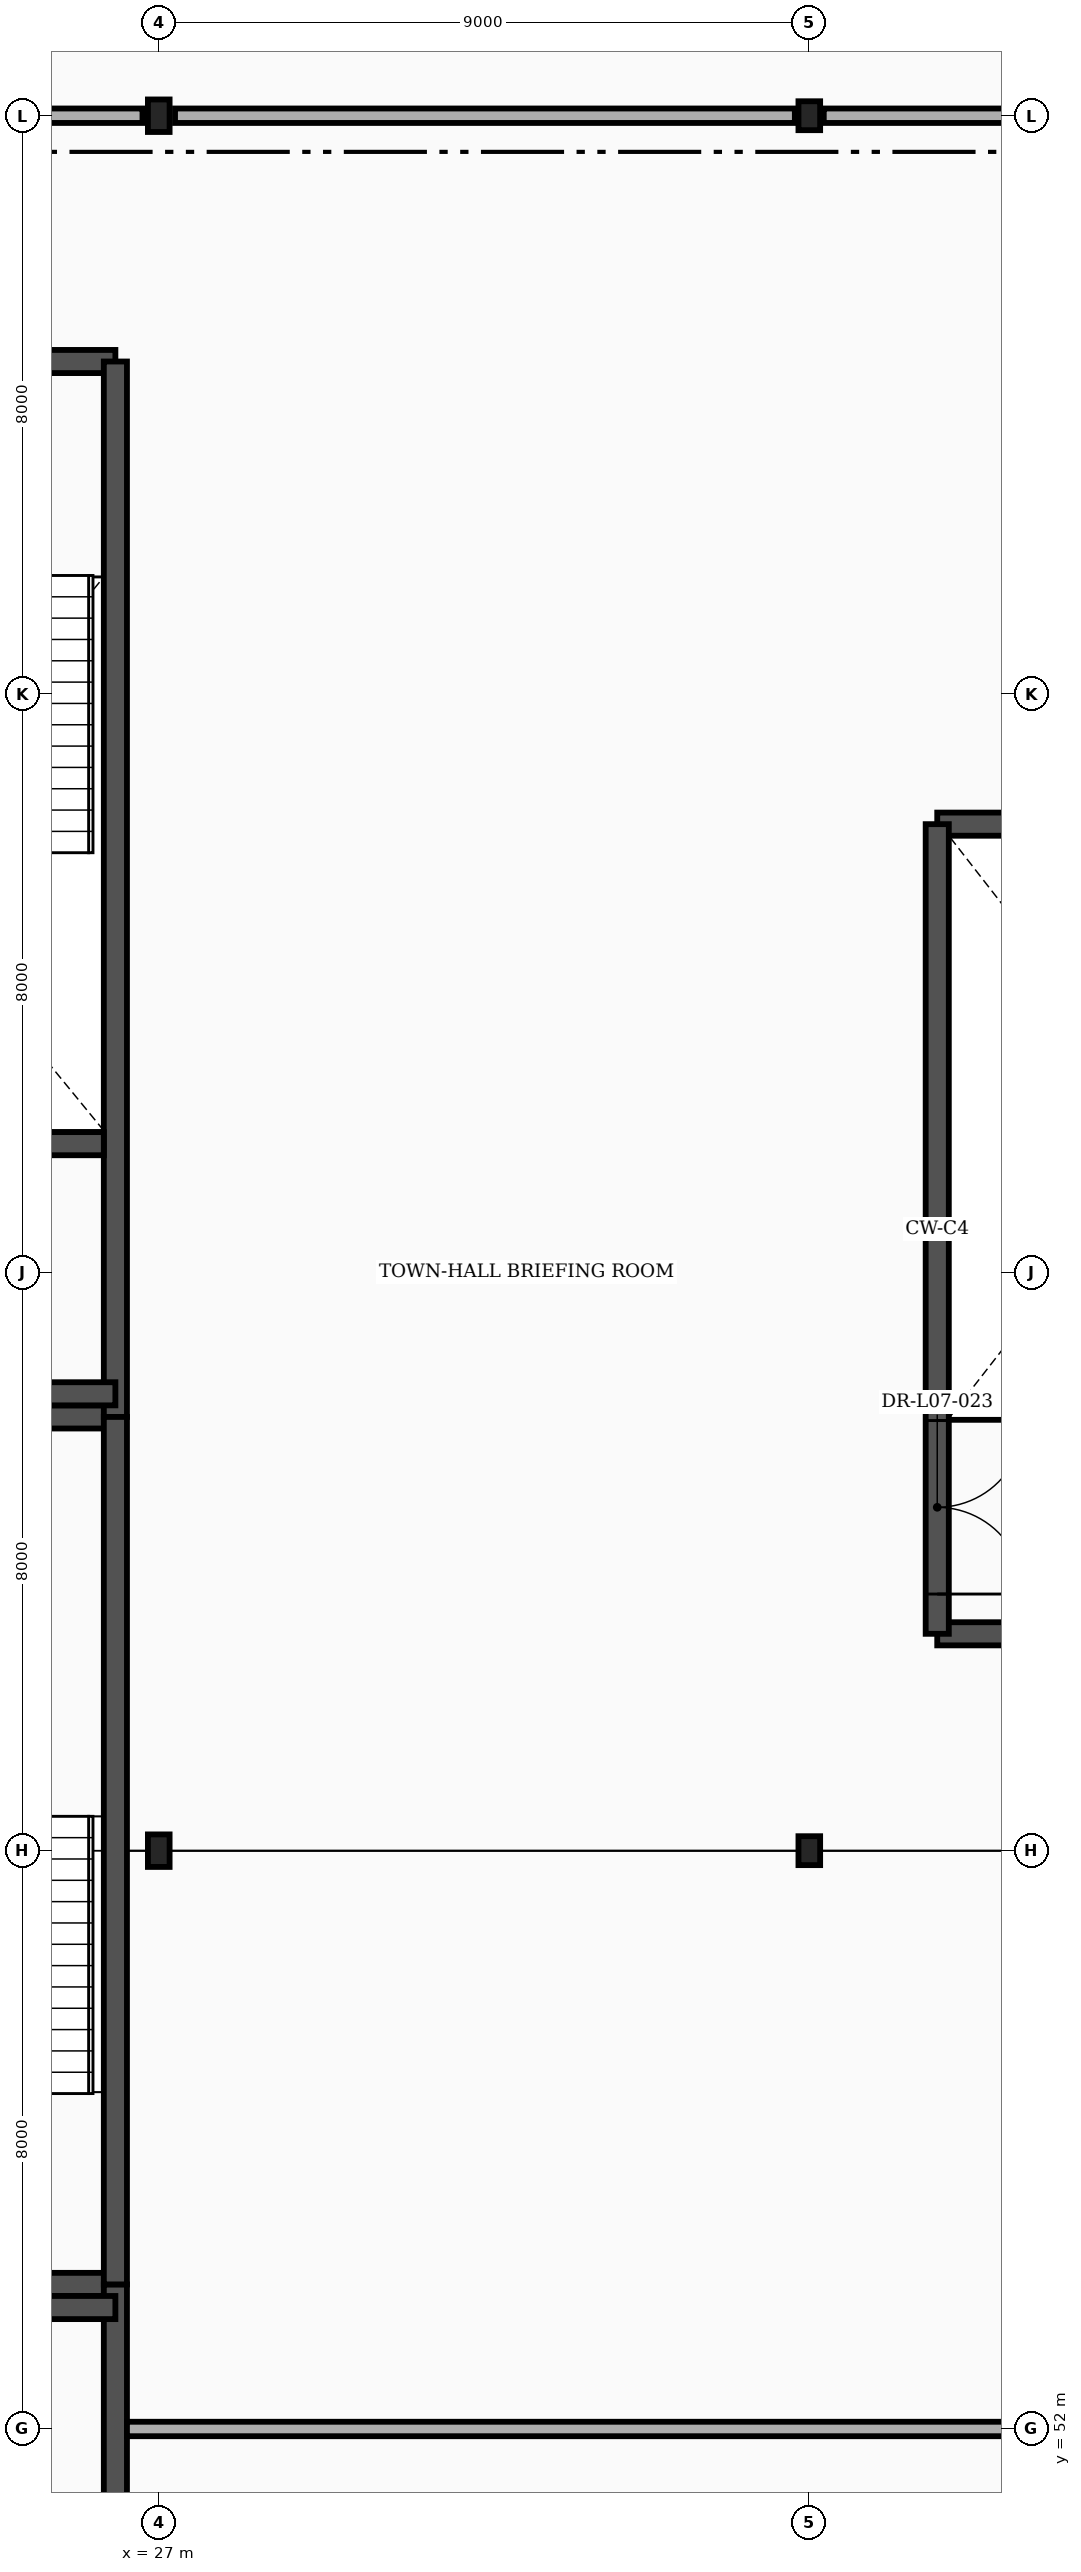
"""IFC4 building model, lengths in metres.
Left out: names, types, materials, properties, quantities, classifications, styles, units other than length and angle.
Written with IfcOpenShell. Run it as: python <this file> out.ifc"""

import sys

from ifc_helpers import new_model, si_unit, direction, frame, frame_2d, origin, origin_2d, place, context, subcontext, project, spatial, rectangle, i_section, extrude, element, fill, save


model = new_model("IFC4")
c1 = context("Model", 3, precision=1e-05, world=origin(), true_north=direction((0.0, 1.0)))
c2 = subcontext(c1, "Body", "Model", "MODEL_VIEW")
j1 = project(units=[si_unit("LENGTHUNIT", "METRE"), si_unit("PLANEANGLEUNIT", "RADIAN")], contexts=[c1])
p1 = place(None, origin())
s1 = spatial("IfcSite", under=j1, at=p1, CompositionType="ELEMENT")
p2 = place(p1, origin())
s2 = spatial("IfcBuilding", under=s1, at=p2, CompositionType="ELEMENT")
p3 = place(p2, frame((0.0, 0.0, 33.3)))
s3 = spatial("IfcBuildingStorey", under=s2, at=p3, CompositionType="ELEMENT", Elevation=33.3)
for number, where, z_axis, x_axis in (
    (1, (27.0, 60.0, 0.0), (0.0, 0.0, 1.0), (1.0, 0.0, 0.0)),
    (2, (27.0, 84.0, 0.0), (0.0, 0.0, 1.0), (1.0, 0.0, 0.0)),
):
    element("IfcColumn", number, at=place(p3, frame(where, z_axis=z_axis, x_axis=x_axis)), inside=s3, PredefinedType="COLUMN", context=c2, shape_type="SweptSolid", body=[
        extrude(i_section(OverallWidth=0.3, OverallDepth=0.45, WebThickness=0.014, FlangeThickness=0.026, FilletRadius=0.027, at=origin_2d()), origin(), (0.0, 0.0, 1.0), 4.5),
    ])
for number, where, z_axis, x_axis in (
    (3, (36.0, 84.0, 0.0), (0.0, 0.0, 1.0), (1.0, 0.0, 0.0)),
    (4, (36.0, 60.0, 0.0), (0.0, 0.0, 1.0), (1.0, 0.0, 0.0)),
):
    element("IfcColumn", number, at=place(p3, frame(where, z_axis=z_axis, x_axis=x_axis)), inside=s3, PredefinedType="COLUMN", context=c2, shape_type="SweptSolid", body=[
        extrude(i_section(OverallWidth=0.3, OverallDepth=0.4, WebThickness=0.013, FlangeThickness=0.024, FilletRadius=0.027, at=origin_2d()), origin(), (0.0, 0.0, 1.0), 4.5),
    ])
p4 = place(p3, frame((19.8, 54.0, 0.0), z_axis=(0.0, 0.0, 1.0), x_axis=(1.0, 0.0, 0.0)))
e5 = element("IfcWall", 5, at=p4, inside=s3, PredefinedType="SHEAR", context=c2, shape_type="SweptSolid", body=[
    extrude(rectangle(XDim=6.6, YDim=0.32, at=frame_2d((3.3, 0.0))), origin(), (0.0, 0.0, 1.0), 4.255),
])
p5 = place(p3, frame((26.4, 39.4, 0.0), z_axis=(0.0, 0.0, 1.0), x_axis=(0.0, 1.0, 0.0)))
e6 = element("IfcWall", 6, at=p5, inside=s3, PredefinedType="SHEAR", context=c2, shape_type="SweptSolid", body=[
    extrude(rectangle(XDim=14.6, YDim=0.32, at=frame_2d((7.3, 0.0))), origin(), (0.0, 0.0, 1.0), 4.255),
])
for number, where, z_axis, x_axis in (
    (7, (19.8, 66.0, 0.0), (0.0, 0.0, 1.0), (1.0, 0.0, 0.0)),
    (8, (19.8, 80.6, 0.0), (0.0, 0.0, 1.0), (1.0, 0.0, 0.0)),
):
    element("IfcWall", number, at=place(p3, frame(where, z_axis=z_axis, x_axis=x_axis)), inside=s3, PredefinedType="SHEAR", context=c2, shape_type="SweptSolid", body=[
        extrude(rectangle(XDim=6.6, YDim=0.32, at=frame_2d((3.3, 0.0))), origin(), (0.0, 0.0, 1.0), 4.255),
    ])
p6 = place(p3, frame((26.4, 66.0, 0.0), z_axis=(0.0, 0.0, 1.0), x_axis=(0.0, 1.0, 0.0)))
e9 = element("IfcWall", 9, at=p6, inside=s3, PredefinedType="SHEAR", context=c2, shape_type="SweptSolid", body=[
    extrude(rectangle(XDim=14.6, YDim=0.32, at=frame_2d((7.3, 0.0))), origin(), (0.0, 0.0, 1.0), 4.255),
])
p7 = place(p3, frame((19.96, 69.78, 0.0), z_axis=(0.0, 0.0, 1.0), x_axis=(1.0, 0.0, 0.0)))
e10 = element("IfcWall", 10, at=p7, inside=s3, PredefinedType="SHEAR", context=c2, shape_type="SweptSolid", body=[
    extrude(rectangle(XDim=6.28, YDim=0.32, at=frame_2d((3.14, 0.0))), origin(), (0.0, 0.0, 1.0), 4.255),
])
for number, where, z_axis, x_axis in (
    (11, (37.77, 63.0, 0.0), (0.0, 0.0, 1.0), (1.0, 0.0, 0.0)),
    (12, (37.77, 74.2, 0.0), (0.0, 0.0, 1.0), (1.0, 0.0, 0.0)),
):
    element("IfcWall", number, at=place(p3, frame(where, z_axis=z_axis, x_axis=x_axis)), inside=s3, PredefinedType="SHEAR", context=c2, shape_type="SweptSolid", body=[
        extrude(rectangle(XDim=6.6, YDim=0.32, at=frame_2d((3.3, 0.0))), origin(), (0.0, 0.0, 1.0), 4.255),
    ])
p8 = place(p3, frame((37.77, 63.0, 0.0), z_axis=(0.0, 0.0, 1.0), x_axis=(0.0, 1.0, 0.0)))
e13 = element("IfcWall", 13, at=p8, inside=s3, PredefinedType="SHEAR", context=c2, shape_type="SweptSolid", body=[
    extrude(rectangle(XDim=11.2, YDim=0.32, at=frame_2d((5.6, 0.0))), origin(), (0.0, 0.0, 1.0), 4.255),
])
p9 = place(p8, frame((0.55, 0.0, 0.0)))
e14 = element("IfcOpeningElement", 14, at=p9, cuts=e13, PredefinedType="OPENING", context=c2, shape_type="SweptSolid", body=[
    extrude(rectangle(XDim=2.4, YDim=2.25, at=frame_2d((1.2, 1.125))), frame((0.0, 0.172, 0.0), z_axis=(0.0, -1.0, 0.0), x_axis=(1.0, 0.0, 0.0)), (0.0, 0.0, 1.0), 0.344),
])
for number, where, z_axis, x_axis in (
    (15, (19.8, 53.68, 0.0), (0.0, 0.0, 1.0), (1.0, 0.0, 0.0)),
    (16, (19.8, 66.32, 0.0), (0.0, 0.0, 1.0), (1.0, 0.0, 0.0)),
):
    element("IfcWall", number, at=place(p3, frame(where, z_axis=z_axis, x_axis=x_axis)), inside=s3, PredefinedType="SHEAR", context=c2, shape_type="SweptSolid", body=[
        extrude(rectangle(XDim=6.6, YDim=0.32, at=frame_2d((3.3, 0.0))), origin(), (0.0, 0.0, 1.0), 4.255),
    ])
p10 = place(p3, frame((26.4, 54.0, 0.0), z_axis=(0.0, 0.0, 1.0), x_axis=(0.0, 1.0, 0.0)))
e17 = element("IfcWall", 17, at=p10, inside=s3, PredefinedType="SHEAR", context=c2, shape_type="SweptSolid", body=[
    extrude(rectangle(XDim=12.0, YDim=0.32, at=frame_2d((6.0, 0.0))), origin(), (0.0, 0.0, 1.0), 4.255),
])
p11 = place(p3, frame((26.56, 52.0, 0.0), z_axis=(0.0, 0.0, 1.0), x_axis=(1.0, 0.0, 0.0)))
e18 = element("IfcWall", 18, at=p11, inside=s3, PredefinedType="PARTITIONING", context=c2, shape_type="SweptSolid", body=[
    extrude(rectangle(XDim=18.27, YDim=0.2, at=frame_2d((9.135, 0.0))), origin(), (0.0, 0.0, 1.0), 3.868),
])
p12 = place(p11, frame((15.46, 0.0, 0.0)))
e19 = element("IfcOpeningElement", 19, at=p12, cuts=e18, PredefinedType="OPENING", context=c2, shape_type="SweptSolid", body=[
    extrude(rectangle(XDim=1.9, YDim=2.35, at=frame_2d((0.95, 1.175))), frame((0.0, 0.112, 0.0), z_axis=(0.0, -1.0, 0.0), x_axis=(1.0, 0.0, 0.0)), (0.0, 0.0, 1.0), 0.224),
])
p13 = place(p3, frame((19.9, 84.0, 0.0), z_axis=(0.0, 0.0, 1.0), x_axis=(1.0, 0.0, 0.0)))
e20 = element("IfcWall", 20, at=p13, inside=s3, PredefinedType="PARTITIONING", context=c2, shape_type="SweptSolid", body=[
    extrude(rectangle(XDim=6.875, YDim=0.2, at=frame_2d((3.438, 0.0))), origin(), (0.0, 0.0, 1.0), 3.493),
])
p14 = place(p3, frame((27.225, 84.0, 0.0), z_axis=(0.0, 0.0, 1.0), x_axis=(1.0, 0.0, 0.0)))
e21 = element("IfcWall", 21, at=p14, inside=s3, PredefinedType="PARTITIONING", context=c2, shape_type="SweptSolid", body=[
    extrude(rectangle(XDim=8.575, YDim=0.2, at=frame_2d((4.288, 0.0))), origin(), (0.0, 0.0, 1.0), 3.802),
])
p15 = place(p3, frame((36.2, 84.0, 0.0), z_axis=(0.0, 0.0, 1.0), x_axis=(1.0, 0.0, 0.0)))
e22 = element("IfcWall", 22, at=p15, inside=s3, PredefinedType="PARTITIONING", context=c2, shape_type="SweptSolid", body=[
    extrude(rectangle(XDim=8.63, YDim=0.2, at=frame_2d((4.315, 0.0))), origin(), (0.0, 0.0, 1.0), 3.766),
])
p16 = place(p9, frame((2.4, 0.0, 0.0), z_axis=(0.0, 0.0, 1.0), x_axis=(-1.0, 0.0, 0.0)))
e23 = element("IfcDoor", 23, at=p16, inside=s3, OperationType="DOUBLE_DOOR_SINGLE_SWING", PredefinedType="DOOR", context=c2, shape_type="SweptSolid", body=[
    extrude(rectangle(XDim=2.4, YDim=2.25, at=frame_2d((1.2, 1.125))), frame((0.0, 0.025, 0.0), z_axis=(0.0, -1.0, 0.0), x_axis=(1.0, 0.0, 0.0)), (0.0, 0.0, 1.0), 0.05),
])
fill(e14, e23)
save(model, sys.argv[1])
